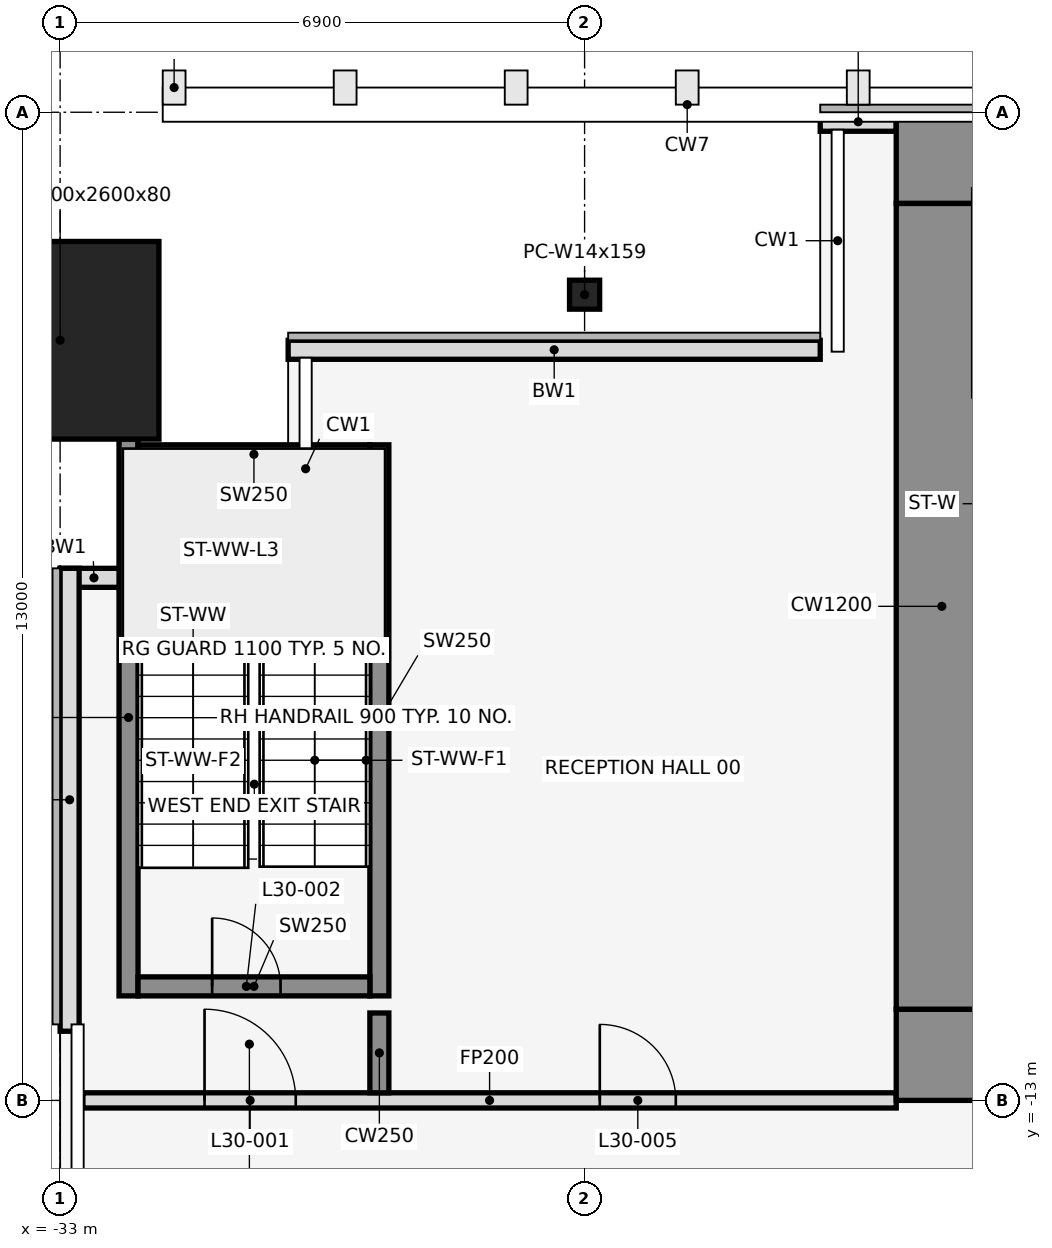
"""IFC4 building model, lengths in metres.
Left out: names, types, materials, properties, quantities, classifications, styles, units other than length and angle.
Written with IfcOpenShell. Run it as: python <this file> out.ifc"""

import sys

from ifc_helpers import new_model, si_unit, direction, frame, frame_2d, origin, origin_2d, place, context, subcontext, project, spatial, rectangle, hollow_rectangle, i_section, extrude, element, fill, save


model = new_model("IFC4")
c1 = context("Model", 3, precision=1e-05, world=origin(), true_north=direction((0.0, 1.0)))
c2 = subcontext(c1, "Body", "Model", "MODEL_VIEW")
j1 = project(units=[si_unit("LENGTHUNIT", "METRE"), si_unit("PLANEANGLEUNIT", "RADIAN")], contexts=[c1])
p1 = place(None, origin())
s1 = spatial("IfcSite", under=j1, at=p1, CompositionType="ELEMENT")
p2 = place(p1, origin())
s2 = spatial("IfcBuilding", under=s1, at=p2, CompositionType="ELEMENT")
p3 = place(p2, frame((0.0, 0.0, 140.4)))
s3 = spatial("IfcBuildingStorey", under=s2, at=p3, CompositionType="ELEMENT", Elevation=140.4)
p4 = place(p3, frame((-33.0, -3.0, 0.0), z_axis=(0.0, 0.0, 1.0), x_axis=(1.0, 0.0, 0.0)))
e1 = element("IfcColumn", 1, at=p4, inside=s3, PredefinedType="COLUMN", context=c2, shape_type="SweptSolid", body=[
    extrude(hollow_rectangle(XDim=2.6, YDim=2.6, WallThickness=0.08, at=origin_2d()), origin(), (0.0, 0.0, 1.0), 4.1),
])
p5 = place(p3, frame((-26.1, -2.4, 0.0), z_axis=(0.0, 0.0, 1.0), x_axis=(1.0, 0.0, 0.0)))
e2 = element("IfcColumn", 2, at=p5, inside=s3, PredefinedType="COLUMN", context=c2, shape_type="SweptSolid", body=[
    extrude(i_section(OverallWidth=0.396, OverallDepth=0.381, WebThickness=0.019, FlangeThickness=0.03, at=origin_2d()), origin(), (0.0, 0.0, 1.0), 4.1),
])
p6 = place(p3, frame((-22.0, -0.125, 0.0), z_axis=(0.0, 0.0, 1.0), x_axis=(-1.0, 0.0, 0.0)))
e3 = element("IfcWall", 3, at=p6, inside=s3, PredefinedType="STANDARD", context=c2, shape_type="SweptSolid", body=[
    extrude(rectangle(XDim=1.0, YDim=0.25, at=frame_2d((0.5, 0.0))), origin(), (0.0, 0.0, 1.0), 3.95),
])
p7 = place(p3, frame((-23.0, -3.125, 0.0), z_axis=(0.0, 0.0, 1.0), x_axis=(-1.0, 0.0, 0.0)))
e4 = element("IfcWall", 4, at=p7, inside=s3, PredefinedType="STANDARD", context=c2, shape_type="SweptSolid", body=[
    extrude(rectangle(XDim=7.0, YDim=0.25, at=frame_2d((3.5, 0.0))), origin(), (0.0, 0.0, 1.0), 3.95),
])
p8 = place(p3, frame((-32.11, -6.125, 0.0), z_axis=(0.0, 0.0, 1.0), x_axis=(-1.0, 0.0, 0.0)))
e5 = element("IfcWall", 5, at=p8, inside=s3, PredefinedType="STANDARD", context=c2, shape_type="SweptSolid", body=[
    extrude(rectangle(XDim=0.89, YDim=0.25, at=frame_2d((0.445, 0.0))), origin(), (0.0, 0.0, 1.0), 3.95),
])
p9 = place(p3, frame((-32.875, -6.0, 0.0), z_axis=(0.0, 0.0, 1.0), x_axis=(0.0, -1.0, 0.0)))
e6 = element("IfcWall", 6, at=p9, inside=s3, PredefinedType="STANDARD", context=c2, shape_type="SweptSolid", body=[
    extrude(rectangle(XDim=6.09, YDim=0.25, at=frame_2d((3.045, 0.0))), origin(), (0.0, 0.0, 1.0), 3.95),
])
p10 = place(p3, frame((-32.1, -11.625, 0.0), z_axis=(0.0, 0.0, 1.0), x_axis=(0.0, 1.0, 0.0)))
e7 = element("IfcWall", 7, at=p10, inside=s3, PredefinedType="SHEAR", context=c2, shape_type="SweptSolid", body=[
    extrude(rectangle(XDim=7.325, YDim=0.25, at=frame_2d((3.663, 0.0))), origin(), (0.0, 0.0, 1.0), 4.1),
])
p11 = place(p3, frame((-28.8, -11.625, 0.0), z_axis=(0.0, 0.0, 1.0), x_axis=(0.0, 1.0, 0.0)))
e8 = element("IfcWall", 8, at=p11, inside=s3, PredefinedType="SHEAR", context=c2, shape_type="SweptSolid", body=[
    extrude(rectangle(XDim=7.25, YDim=0.25, at=frame_2d((3.625, 0.0))), origin(), (0.0, 0.0, 1.0), 4.1),
])
p12 = place(p3, frame((-31.975, -11.5, 0.0), z_axis=(0.0, 0.0, 1.0), x_axis=(1.0, 0.0, 0.0)))
e9 = element("IfcWall", 9, at=p12, inside=s3, PredefinedType="SHEAR", context=c2, shape_type="SweptSolid", body=[
    extrude(rectangle(XDim=3.05, YDim=0.25, at=frame_2d((1.525, 0.0))), origin(), (0.0, 0.0, 1.0), 4.1),
])
p13 = place(p12, frame((0.975, 0.0, 0.0)))
e10 = element("IfcOpeningElement", 10, at=p13, cuts=e9, PredefinedType="OPENING", context=c2, shape_type="SweptSolid", body=[
    extrude(rectangle(XDim=0.9, YDim=2.1, at=frame_2d((0.45, 1.05))), frame((0.0, 0.137, 0.0), z_axis=(0.0, -1.0, 0.0), x_axis=(1.0, 0.0, 0.0)), (0.0, 0.0, 1.0), 0.274),
])
p14 = place(p3, frame((-31.975, -4.5, 0.0), z_axis=(0.0, 0.0, 1.0), x_axis=(1.0, 0.0, 0.0)))
e11 = element("IfcWall", 11, at=p14, inside=s3, PredefinedType="SHEAR", context=c2, shape_type="SweptSolid", body=[
    extrude(rectangle(XDim=3.05, YDim=0.25, at=frame_2d((1.525, 0.0))), origin(), (0.0, 0.0, 1.0), 4.1),
])
p15 = place(p3, frame((-32.7, -13.0, 0.0), z_axis=(0.0, 0.0, 1.0), x_axis=(1.0, 0.0, 0.0)))
e12 = element("IfcWall", 12, at=p15, inside=s3, PredefinedType="PARTITIONING", context=c2, shape_type="SweptSolid", body=[
    extrude(rectangle(XDim=10.7, YDim=0.2, at=frame_2d((5.35, 0.0))), origin(), (0.0, 0.0, 1.0), 2.939),
])
p16 = place(p15, frame((1.6, 0.0, 0.0)))
e13 = element("IfcOpeningElement", 13, at=p16, cuts=e12, PredefinedType="OPENING", context=c2, shape_type="SweptSolid", body=[
    extrude(rectangle(XDim=1.2, YDim=2.1, at=frame_2d((0.6, 1.05))), frame((0.0, 0.112, 0.0), z_axis=(0.0, -1.0, 0.0), x_axis=(1.0, 0.0, 0.0)), (0.0, 0.0, 1.0), 0.224),
])
p17 = place(p15, frame((6.8, 0.0, 0.0)))
e14 = element("IfcOpeningElement", 14, at=p17, cuts=e12, PredefinedType="OPENING", context=c2, shape_type="SweptSolid", body=[
    extrude(rectangle(XDim=1.0, YDim=2.1, at=frame_2d((0.5, 1.05))), frame((0.0, 0.112, 0.0), z_axis=(0.0, -1.0, 0.0), x_axis=(1.0, 0.0, 0.0)), (0.0, 0.0, 1.0), 0.224),
])
p18 = place(p3, frame((-28.8, -12.9, 0.0), z_axis=(0.0, 0.0, 1.0), x_axis=(0.0, 1.0, 0.0)))
e15 = element("IfcWall", 15, at=p18, inside=s3, PredefinedType="SHEAR", context=c2, shape_type="SweptSolid", body=[
    extrude(rectangle(XDim=1.05, YDim=0.25, at=frame_2d((0.525, 0.0))), origin(), (0.0, 0.0, 1.0), 4.1),
])
p19 = place(p3, frame((-22.0, -0.6, 0.0), z_axis=(0.0, 0.0, 1.0), x_axis=(1.0, 0.0, 0.0)))
e16 = element("IfcWall", 16, at=p19, inside=s3, PredefinedType="SHEAR", context=c2, shape_type="SweptSolid", body=[
    extrude(rectangle(XDim=44.0, YDim=1.2, at=frame_2d((22.0, 0.0))), origin(), (0.0, 0.0, 1.0), 4.1),
])
p20 = place(p19, frame((18.55, 0.0, 0.0)))
e17 = element("IfcOpeningElement", 17, at=p20, cuts=e16, PredefinedType="OPENING", context=c2, shape_type="SweptSolid", body=[
    extrude(rectangle(XDim=0.9, YDim=2.1, at=frame_2d((0.45, 1.05))), frame((0.0, 0.612, 0.0), z_axis=(0.0, -1.0, 0.0), x_axis=(1.0, 0.0, 0.0)), (0.0, 0.0, 1.0), 1.224),
])
p21 = place(p19, frame((24.55, 0.0, 0.0)))
e18 = element("IfcOpeningElement", 18, at=p21, cuts=e16, PredefinedType="OPENING", context=c2, shape_type="SweptSolid", body=[
    extrude(rectangle(XDim=0.9, YDim=2.1, at=frame_2d((0.45, 1.05))), frame((0.0, 0.612, 0.0), z_axis=(0.0, -1.0, 0.0), x_axis=(1.0, 0.0, 0.0)), (0.0, 0.0, 1.0), 1.224),
])
p22 = place(p3, frame((-22.0, -12.4, 0.0), z_axis=(0.0, 0.0, 1.0), x_axis=(1.0, 0.0, 0.0)))
e19 = element("IfcWall", 19, at=p22, inside=s3, PredefinedType="SHEAR", context=c2, shape_type="SweptSolid", body=[
    extrude(rectangle(XDim=44.0, YDim=1.2, at=frame_2d((22.0, 0.0))), origin(), (0.0, 0.0, 1.0), 4.1),
])
p23 = place(p22, frame((2.2, 0.0, 0.0)))
e20 = element("IfcOpeningElement", 20, at=p23, cuts=e19, PredefinedType="OPENING", context=c2, shape_type="SweptSolid", body=[
    extrude(rectangle(XDim=1.2, YDim=2.1, at=frame_2d((0.6, 1.05))), frame((0.0, 0.612, 0.0), z_axis=(0.0, -1.0, 0.0), x_axis=(1.0, 0.0, 0.0)), (0.0, 0.0, 1.0), 1.224),
])
p24 = place(p22, frame((21.4, 0.0, 0.0)))
e21 = element("IfcOpeningElement", 21, at=p24, cuts=e19, PredefinedType="OPENING", context=c2, shape_type="SweptSolid", body=[
    extrude(rectangle(XDim=1.2, YDim=2.1, at=frame_2d((0.6, 1.05))), frame((0.0, 0.612, 0.0), z_axis=(0.0, -1.0, 0.0), x_axis=(1.0, 0.0, 0.0)), (0.0, 0.0, 1.0), 1.224),
])
p25 = place(p22, frame((40.6, 0.0, 0.0)))
e22 = element("IfcOpeningElement", 22, at=p25, cuts=e19, PredefinedType="OPENING", context=c2, shape_type="SweptSolid", body=[
    extrude(rectangle(XDim=1.2, YDim=2.1, at=frame_2d((0.6, 1.05))), frame((0.0, 0.612, 0.0), z_axis=(0.0, -1.0, 0.0), x_axis=(1.0, 0.0, 0.0)), (0.0, 0.0, 1.0), 1.224),
])
p26 = place(p22, frame((16.0, 0.0, 0.0)))
e23 = element("IfcOpeningElement", 23, at=p26, cuts=e19, PredefinedType="OPENING", context=c2, shape_type="SweptSolid", body=[
    extrude(rectangle(XDim=1.8, YDim=2.1, at=frame_2d((0.9, 1.05))), frame((0.0, 0.612, 0.0), z_axis=(0.0, -1.0, 0.0), x_axis=(1.0, 0.0, 0.0)), (0.0, 0.0, 1.0), 1.224),
])
p27 = place(p22, frame((6.3, 0.0, 0.0)))
e24 = element("IfcOpeningElement", 24, at=p27, cuts=e19, PredefinedType="OPENING", context=c2, shape_type="SweptSolid", body=[
    extrude(rectangle(XDim=1.2, YDim=2.1, at=frame_2d((0.6, 1.05))), frame((0.0, 0.612, 0.0), z_axis=(0.0, -1.0, 0.0), x_axis=(1.0, 0.0, 0.0)), (0.0, 0.0, 1.0), 1.224),
])
p28 = place(p22, frame((26.2, 0.0, 0.0)))
e25 = element("IfcOpeningElement", 25, at=p28, cuts=e19, PredefinedType="OPENING", context=c2, shape_type="SweptSolid", body=[
    extrude(rectangle(XDim=1.8, YDim=2.1, at=frame_2d((0.9, 1.05))), frame((0.0, 0.612, 0.0), z_axis=(0.0, -1.0, 0.0), x_axis=(1.0, 0.0, 0.0)), (0.0, 0.0, 1.0), 1.224),
])
p29 = place(p22, frame((36.5, 0.0, 0.0)))
e26 = element("IfcOpeningElement", 26, at=p29, cuts=e19, PredefinedType="OPENING", context=c2, shape_type="SweptSolid", body=[
    extrude(rectangle(XDim=1.2, YDim=2.1, at=frame_2d((0.6, 1.05))), frame((0.0, 0.612, 0.0), z_axis=(0.0, -1.0, 0.0), x_axis=(1.0, 0.0, 0.0)), (0.0, 0.0, 1.0), 1.224),
])
p30 = place(p3, frame((-21.4, -11.8, 0.0), z_axis=(0.0, 0.0, 1.0), x_axis=(0.0, 1.0, 0.0)))
e27 = element("IfcWall", 27, at=p30, inside=s3, PredefinedType="SHEAR", context=c2, shape_type="SweptSolid", body=[
    extrude(rectangle(XDim=10.6, YDim=1.2, at=frame_2d((5.3, 0.0))), origin(), (0.0, 0.0, 1.0), 4.1),
])
p31 = place(p16, origin())
e28 = element("IfcDoor", 28, at=p31, inside=s3, OperationType="SINGLE_SWING_LEFT", PredefinedType="DOOR", context=c2, shape_type="SweptSolid", body=[
    extrude(rectangle(XDim=1.2, YDim=2.1, at=frame_2d((0.6, 1.05))), frame((0.0, 0.025, 0.0), z_axis=(0.0, -1.0, 0.0), x_axis=(1.0, 0.0, 0.0)), (0.0, 0.0, 1.0), 0.05),
])
fill(e13, e28)
p32 = place(p13, origin())
e29 = element("IfcDoor", 29, at=p32, inside=s3, OperationType="SINGLE_SWING_LEFT", PredefinedType="DOOR", context=c2, shape_type="SweptSolid", body=[
    extrude(rectangle(XDim=0.9, YDim=2.1, at=frame_2d((0.45, 1.05))), frame((0.0, 0.025, 0.0), z_axis=(0.0, -1.0, 0.0), x_axis=(1.0, 0.0, 0.0)), (0.0, 0.0, 1.0), 0.05),
])
fill(e10, e29)
p33 = place(p17, origin())
e30 = element("IfcDoor", 30, at=p33, inside=s3, OperationType="SINGLE_SWING_LEFT", PredefinedType="DOOR", context=c2, shape_type="SweptSolid", body=[
    extrude(rectangle(XDim=1.0, YDim=2.1, at=frame_2d((0.5, 1.05))), frame((0.0, 0.025, 0.0), z_axis=(0.0, -1.0, 0.0), x_axis=(1.0, 0.0, 0.0)), (0.0, 0.0, 1.0), 0.05),
])
fill(e14, e30)
save(model, sys.argv[1])
